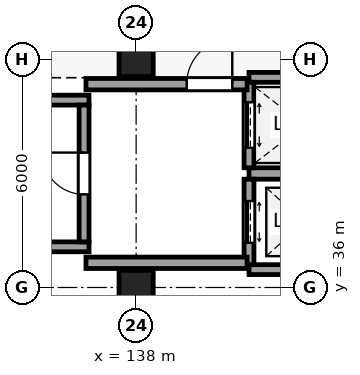
"""IFC4 building model, lengths in metres.
Left out: names, types, materials, properties, quantities, classifications, styles, units other than length and angle.
Written with IfcOpenShell. Run it as: python <this file> out.ifc"""

import sys

from ifc_helpers import new_model, si_unit, direction, frame, frame_2d, origin, origin_2d, place, context, subcontext, project, spatial, rectangle, extrude, element, fill, save


model = new_model("IFC4")
c1 = context("Model", 3, precision=1e-05, world=origin(), true_north=direction((0.0, 1.0)))
c2 = subcontext(c1, "Body", "Model", "MODEL_VIEW")
j1 = project(units=[si_unit("LENGTHUNIT", "METRE"), si_unit("PLANEANGLEUNIT", "RADIAN")], contexts=[c1])
p1 = place(None, origin())
s1 = spatial("IfcSite", under=j1, at=p1, CompositionType="ELEMENT")
p2 = place(p1, origin())
s2 = spatial("IfcBuilding", under=s1, at=p2, CompositionType="ELEMENT")
p3 = place(p2, frame((0.0, 0.0, -4.8)))
s3 = spatial("IfcBuildingStorey", under=s2, at=p3, CompositionType="ELEMENT", Elevation=-4.8)
for number, where, z_axis, x_axis in (
    (1, (138.0, 36.0, 0.0), (0.0, 0.0, 1.0), (1.0, 0.0, 0.0)),
    (2, (138.0, 42.0, 0.0), (0.0, 0.0, 1.0), (1.0, 0.0, 0.0)),
):
    element("IfcColumn", number, at=place(p3, frame(where, z_axis=z_axis, x_axis=x_axis)), inside=s3, PredefinedType="COLUMN", context=c2, shape_type="SweptSolid", body=[
        extrude(rectangle(XDim=0.9, YDim=0.9, at=origin_2d()), origin(), (0.0, 0.0, 1.0), 4.8),
    ])
for number, where, z_axis, x_axis in (
    (3, (126.04, 37.07, -0.5), (0.0, 0.0, 1.0), (1.0, 0.0, 0.0)),
    (4, (126.04, 40.93, -0.5), (0.0, 0.0, 1.0), (1.0, 0.0, 0.0)),
):
    element("IfcWall", number, at=place(p3, frame(where, z_axis=z_axis, x_axis=x_axis)), inside=s3, PredefinedType="SHEAR", context=c2, shape_type="SweptSolid", body=[
        extrude(rectangle(XDim=10.72, YDim=0.26, at=frame_2d((5.36, 0.0))), origin(), (0.0, 0.0, 1.0), 5.3),
    ])
p4 = place(p3, frame((136.63, 37.2, -0.5), z_axis=(0.0, 0.0, 1.0), x_axis=(0.0, 1.0, 0.0)))
e5 = element("IfcWall", 5, at=p4, inside=s3, PredefinedType="SHEAR", context=c2, shape_type="SweptSolid", body=[
    extrude(rectangle(XDim=3.6, YDim=0.26, at=frame_2d((1.8, 0.0))), origin(), (0.0, 0.0, 1.0), 5.3),
])
p5 = place(p4, frame((1.25, 0.0, 0.5)))
e6 = element("IfcOpeningElement", 6, at=p5, cuts=e5, PredefinedType="OPENING", context=c2, shape_type="SweptSolid", body=[
    extrude(rectangle(XDim=1.1, YDim=2.15, at=frame_2d((0.55, 1.075))), frame((0.0, 0.14, 0.0), z_axis=(0.0, -1.0, 0.0), x_axis=(1.0, 0.0, 0.0)), (0.0, 0.0, 1.0), 0.28),
])
p6 = place(p3, frame((140.97, 36.47, -0.5), z_axis=(0.0, 0.0, 1.0), x_axis=(1.0, 0.0, 0.0)))
e7 = element("IfcWall", 7, at=p6, inside=s3, PredefinedType="SHEAR", context=c2, shape_type="SweptSolid", body=[
    extrude(rectangle(XDim=2.91, YDim=0.26, at=frame_2d((1.455, 0.0))), origin(), (0.0, 0.0, 1.0), 5.3),
])
p7 = place(p3, frame((140.97, 39.0, -0.5), z_axis=(0.0, 0.0, 1.0), x_axis=(1.0, 0.0, 0.0)))
e8 = element("IfcWall", 8, at=p7, inside=s3, PredefinedType="SHEAR", context=c2, shape_type="SweptSolid", body=[
    extrude(rectangle(XDim=2.91, YDim=0.3, at=frame_2d((1.455, 0.0))), origin(), (0.0, 0.0, 1.0), 5.3),
])
p8 = place(p3, frame((140.97, 36.6, -0.5), z_axis=(0.0, 0.0, 1.0), x_axis=(0.0, 1.0, 0.0)))
e9 = element("IfcWall", 9, at=p8, inside=s3, PredefinedType="SHEAR", context=c2, shape_type="SweptSolid", body=[
    extrude(rectangle(XDim=2.25, YDim=0.26, at=frame_2d((1.125, 0.0))), origin(), (0.0, 0.0, 1.0), 5.3),
])
p9 = place(p8, frame((0.575, 0.0, 0.5)))
e10 = element("IfcOpeningElement", 10, at=p9, cuts=e9, PredefinedType="OPENING", context=c2, shape_type="SweptSolid", body=[
    extrude(rectangle(XDim=1.1, YDim=2.2, at=frame_2d((0.55, 1.1))), frame((0.0, 0.14, 0.0), z_axis=(0.0, -1.0, 0.0), x_axis=(1.0, 0.0, 0.0)), (0.0, 0.0, 1.0), 0.28),
])
p10 = place(p3, frame((140.97, 41.53, -0.5), z_axis=(0.0, 0.0, 1.0), x_axis=(1.0, 0.0, 0.0)))
e11 = element("IfcWall", 11, at=p10, inside=s3, PredefinedType="SHEAR", context=c2, shape_type="SweptSolid", body=[
    extrude(rectangle(XDim=2.91, YDim=0.26, at=frame_2d((1.455, 0.0))), origin(), (0.0, 0.0, 1.0), 5.3),
])
p11 = place(p3, frame((140.97, 39.15, -0.5), z_axis=(0.0, 0.0, 1.0), x_axis=(0.0, 1.0, 0.0)))
e12 = element("IfcWall", 12, at=p11, inside=s3, PredefinedType="SHEAR", context=c2, shape_type="SweptSolid", body=[
    extrude(rectangle(XDim=2.25, YDim=0.26, at=frame_2d((1.125, 0.0))), origin(), (0.0, 0.0, 1.0), 5.3),
])
p12 = place(p11, frame((0.525, 0.0, 0.5)))
e13 = element("IfcOpeningElement", 13, at=p12, cuts=e12, PredefinedType="OPENING", context=c2, shape_type="SweptSolid", body=[
    extrude(rectangle(XDim=1.2, YDim=2.25, at=frame_2d((0.6, 1.125))), frame((0.0, 0.14, 0.0), z_axis=(0.0, -1.0, 0.0), x_axis=(1.0, 0.0, 0.0)), (0.0, 0.0, 1.0), 0.28),
])
p13 = place(p3, frame((136.68, 41.35, -0.5), z_axis=(0.0, 0.0, 1.0), x_axis=(1.0, 0.0, 0.0)))
e14 = element("IfcWall", 14, at=p13, inside=s3, PredefinedType="SHEAR", context=c2, shape_type="SweptSolid", body=[
    extrude(rectangle(XDim=4.24, YDim=0.3, at=frame_2d((2.12, 0.0))), origin(), (0.0, 0.0, 1.0), 5.3),
])
p14 = place(p13, frame((2.65, 0.0, 0.5)))
e15 = element("IfcOpeningElement", 15, at=p14, cuts=e14, PredefinedType="OPENING", context=c2, shape_type="SweptSolid", body=[
    extrude(rectangle(XDim=1.2, YDim=2.2, at=frame_2d((0.6, 1.1))), frame((0.0, 0.16, 0.0), z_axis=(0.0, -1.0, 0.0), x_axis=(1.0, 0.0, 0.0)), (0.0, 0.0, 1.0), 0.32),
])
p15 = place(p3, frame((136.68, 36.65, -0.5), z_axis=(0.0, 0.0, 1.0), x_axis=(1.0, 0.0, 0.0)))
e16 = element("IfcWall", 16, at=p15, inside=s3, PredefinedType="SHEAR", context=c2, shape_type="SweptSolid", body=[
    extrude(rectangle(XDim=4.24, YDim=0.3, at=frame_2d((2.12, 0.0))), origin(), (0.0, 0.0, 1.0), 5.3),
])
p16 = place(p5, origin())
e17 = element("IfcDoor", 17, at=p16, inside=s3, OperationType="SINGLE_SWING_RIGHT", PredefinedType="DOOR", context=c2, shape_type="SweptSolid", body=[
    extrude(rectangle(XDim=1.1, YDim=2.15, at=frame_2d((0.55, 1.075))), frame((0.0, 0.025, 0.0), z_axis=(0.0, -1.0, 0.0), x_axis=(1.0, 0.0, 0.0)), (0.0, 0.0, 1.0), 0.05),
])
fill(e6, e17)
p17 = place(p9, origin())
e18 = element("IfcDoor", 18, at=p17, inside=s3, OperationType="DOUBLE_DOOR_SLIDING", PredefinedType="DOOR", context=c2, shape_type="SweptSolid", body=[
    extrude(rectangle(XDim=1.1, YDim=2.2, at=frame_2d((0.55, 1.1))), frame((0.0, 0.025, 0.0), z_axis=(0.0, -1.0, 0.0), x_axis=(1.0, 0.0, 0.0)), (0.0, 0.0, 1.0), 0.05),
])
fill(e10, e18)
p18 = place(p12, origin())
e19 = element("IfcDoor", 19, at=p18, inside=s3, OperationType="DOUBLE_DOOR_SLIDING", PredefinedType="DOOR", context=c2, shape_type="SweptSolid", body=[
    extrude(rectangle(XDim=1.2, YDim=2.25, at=frame_2d((0.6, 1.125))), frame((0.0, 0.025, 0.0), z_axis=(0.0, -1.0, 0.0), x_axis=(1.0, 0.0, 0.0)), (0.0, 0.0, 1.0), 0.05),
])
fill(e13, e19)
p19 = place(p14, origin())
e20 = element("IfcDoor", 20, at=p19, inside=s3, OperationType="SINGLE_SWING_RIGHT", PredefinedType="DOOR", context=c2, shape_type="SweptSolid", body=[
    extrude(rectangle(XDim=1.2, YDim=2.2, at=frame_2d((0.6, 1.1))), frame((0.0, 0.025, 0.0), z_axis=(0.0, -1.0, 0.0), x_axis=(1.0, 0.0, 0.0)), (0.0, 0.0, 1.0), 0.05),
])
fill(e15, e20)
save(model, sys.argv[1])
